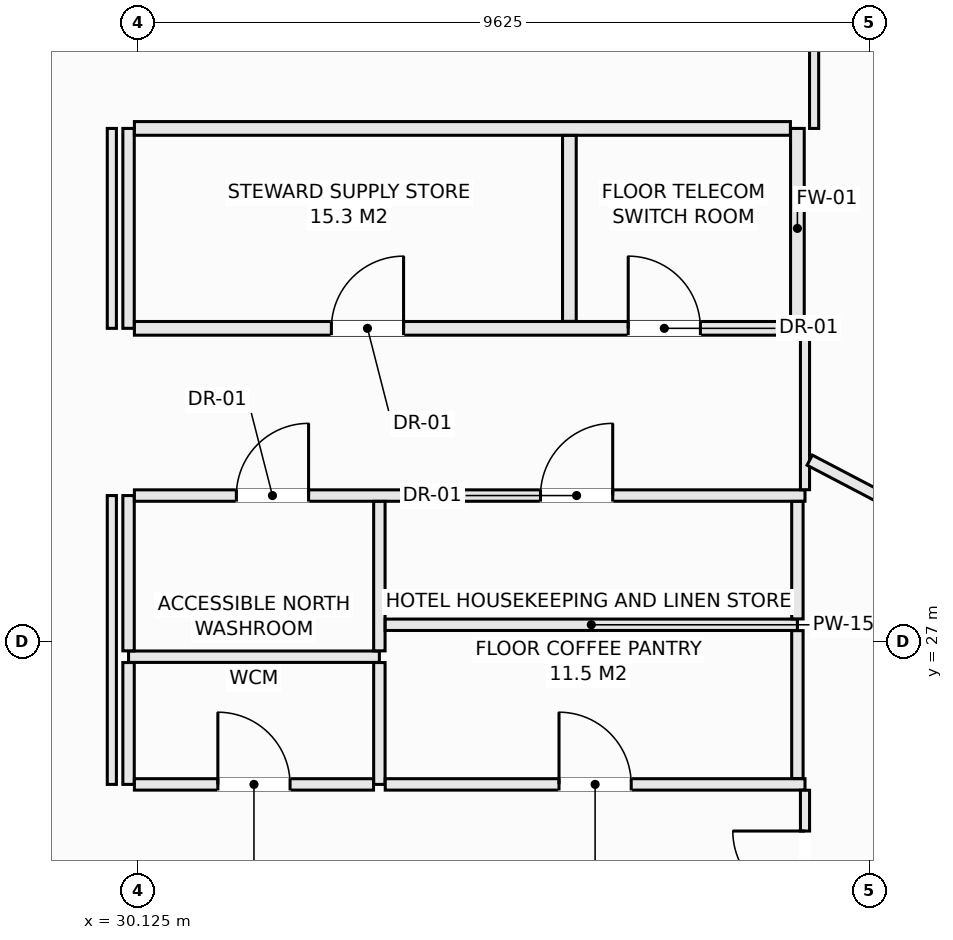
"""IFC4 building model, lengths in metres.
Left out: names, types, materials, properties, quantities, classifications, styles, units other than length and angle.
Written with IfcOpenShell. Run it as: python <this file> out.ifc"""

import sys

from ifc_helpers import new_model, si_unit, direction, frame, frame_2d, origin, place, context, subcontext, project, spatial, rectangle, extrude, element, fill, save


model = new_model("IFC4")
c1 = context("Model", 3, precision=1e-05, world=origin(), true_north=direction((0.0, 1.0)))
c2 = subcontext(c1, "Body", "Model", "MODEL_VIEW")
j1 = project(units=[si_unit("LENGTHUNIT", "METRE"), si_unit("PLANEANGLEUNIT", "RADIAN")], contexts=[c1])
p1 = place(None, origin())
s1 = spatial("IfcSite", under=j1, at=p1, CompositionType="ELEMENT")
p2 = place(p1, origin())
s2 = spatial("IfcBuilding", under=s1, at=p2, CompositionType="ELEMENT")
p3 = place(p2, frame((0.0, 0.0, 152.9)))
s3 = spatial("IfcBuildingStorey", under=s2, at=p3, CompositionType="ELEMENT", Elevation=152.9)
p4 = place(p3, frame((30.0, 26.8, 0.0), z_axis=(0.0, 0.0, 1.0), x_axis=(1.0, 0.0, 0.0)))
e1 = element("IfcWall", 1, at=p4, inside=s3, PredefinedType="PARTITIONING", context=c2, shape_type="SweptSolid", body=[
    extrude(rectangle(XDim=3.3, YDim=0.15, at=frame_2d((1.65, 0.0))), origin(), (0.0, 0.0, 1.0), 3.13),
])
p5 = place(p3, frame((30.0, 25.12, 0.0), z_axis=(0.0, 0.0, 1.0), x_axis=(0.0, 1.0, 0.0)))
e2 = element("IfcWall", 2, at=p5, inside=s3, PredefinedType="PARTITIONING", context=c2, shape_type="SweptSolid", body=[
    extrude(rectangle(XDim=1.603, YDim=0.15, at=frame_2d((0.801, 0.0))), origin(), (0.0, 0.0, 1.0), 3.13),
])
p6 = place(p3, frame((30.0, 26.877, 0.0), z_axis=(0.0, 0.0, 1.0), x_axis=(0.0, 1.0, 0.0)))
e3 = element("IfcWall", 3, at=p6, inside=s3, PredefinedType="PARTITIONING", context=c2, shape_type="SweptSolid", body=[
    extrude(rectangle(XDim=2.043, YDim=0.15, at=frame_2d((1.021, 0.0))), origin(), (0.0, 0.0, 1.0), 3.13),
])
p7 = place(p3, frame((30.0, 31.12, 0.0), z_axis=(0.0, 0.0, 1.0), x_axis=(0.0, 1.0, 0.0)))
e4 = element("IfcWall", 4, at=p7, inside=s3, PredefinedType="PARTITIONING", context=c2, shape_type="SweptSolid", body=[
    extrude(rectangle(XDim=2.63, YDim=0.15, at=frame_2d((1.315, 0.0))), origin(), (0.0, 0.0, 1.0), 3.13),
])
p8 = place(p3, frame((30.077, 28.92, 0.0), z_axis=(0.0, 0.0, 1.0), x_axis=(1.0, 0.0, 0.0)))
e5 = element("IfcWall", 5, at=p8, inside=s3, PredefinedType="PARTITIONING", context=c2, shape_type="SweptSolid", body=[
    extrude(rectangle(XDim=8.823, YDim=0.15, at=frame_2d((4.412, 0.0))), origin(), (0.0, 0.0, 1.0), 3.13),
])
p9 = place(p8, frame((1.342, 0.0, 0.0)))
e6 = element("IfcOpeningElement", 6, at=p9, cuts=e5, PredefinedType="OPENING", context=c2, shape_type="SweptSolid", body=[
    extrude(rectangle(XDim=0.95, YDim=2.1, at=frame_2d((0.475, 1.05))), frame((0.0, 0.085, 0.0), z_axis=(0.0, -1.0, 0.0), x_axis=(1.0, 0.0, 0.0)), (0.0, 0.0, 1.0), 0.17),
])
p10 = place(p8, frame((5.343, 0.0, 0.0)))
e7 = element("IfcOpeningElement", 7, at=p10, cuts=e5, PredefinedType="OPENING", context=c2, shape_type="SweptSolid", body=[
    extrude(rectangle(XDim=0.95, YDim=2.1, at=frame_2d((0.475, 1.05))), frame((0.0, 0.085, 0.0), z_axis=(0.0, -1.0, 0.0), x_axis=(1.0, 0.0, 0.0)), (0.0, 0.0, 1.0), 0.17),
])
p11 = place(p3, frame((33.3, 25.12, 0.0), z_axis=(0.0, 0.0, 1.0), x_axis=(0.0, 1.0, 0.0)))
e8 = element("IfcWall", 8, at=p11, inside=s3, PredefinedType="PARTITIONING", context=c2, shape_type="SweptSolid", body=[
    extrude(rectangle(XDim=1.603, YDim=0.15, at=frame_2d((0.801, 0.0))), origin(), (0.0, 0.0, 1.0), 3.13),
])
p12 = place(p3, frame((33.3, 26.877, 0.0), z_axis=(0.0, 0.0, 1.0), x_axis=(0.0, 1.0, 0.0)))
e9 = element("IfcWall", 9, at=p12, inside=s3, PredefinedType="PARTITIONING", context=c2, shape_type="SweptSolid", body=[
    extrude(rectangle(XDim=1.966, YDim=0.15, at=frame_2d((0.983, 0.0))), origin(), (0.0, 0.0, 1.0), 3.13),
])
p13 = place(p3, frame((30.077, 25.12, 0.0), z_axis=(0.0, 0.0, 1.0), x_axis=(1.0, 0.0, 0.0)))
e10 = element("IfcWall", 10, at=p13, inside=s3, PredefinedType="PARTITIONING", context=c2, shape_type="SweptSolid", body=[
    extrude(rectangle(XDim=3.146, YDim=0.15, at=frame_2d((1.573, 0.0))), origin(), (0.0, 0.0, 1.0), 3.13),
])
p14 = place(p13, frame((1.098, 0.0, 0.0)))
e11 = element("IfcOpeningElement", 11, at=p14, cuts=e10, PredefinedType="OPENING", context=c2, shape_type="SweptSolid", body=[
    extrude(rectangle(XDim=0.95, YDim=2.1, at=frame_2d((0.475, 1.05))), frame((0.0, 0.085, 0.0), z_axis=(0.0, -1.0, 0.0), x_axis=(1.0, 0.0, 0.0)), (0.0, 0.0, 1.0), 0.17),
])
p15 = place(p3, frame((33.377, 25.12, 0.0), z_axis=(0.0, 0.0, 1.0), x_axis=(1.0, 0.0, 0.0)))
e12 = element("IfcWall", 12, at=p15, inside=s3, PredefinedType="PARTITIONING", context=c2, shape_type="SweptSolid", body=[
    extrude(rectangle(XDim=5.523, YDim=0.15, at=frame_2d((2.761, 0.0))), origin(), (0.0, 0.0, 1.0), 3.13),
])
p16 = place(p15, frame((2.287, 0.0, 0.0)))
e13 = element("IfcOpeningElement", 13, at=p16, cuts=e12, PredefinedType="OPENING", context=c2, shape_type="SweptSolid", body=[
    extrude(rectangle(XDim=0.95, YDim=2.1, at=frame_2d((0.475, 1.05))), frame((0.0, 0.085, 0.0), z_axis=(0.0, -1.0, 0.0), x_axis=(1.0, 0.0, 0.0)), (0.0, 0.0, 1.0), 0.17),
])
p17 = place(p3, frame((33.377, 27.22, 0.0), z_axis=(0.0, 0.0, 1.0), x_axis=(1.0, 0.0, 0.0)))
e14 = element("IfcWall", 14, at=p17, inside=s3, PredefinedType="PARTITIONING", context=c2, shape_type="SweptSolid", body=[
    extrude(rectangle(XDim=5.423, YDim=0.15, at=frame_2d((2.711, 0.0))), origin(), (0.0, 0.0, 1.0), 3.13),
])
p18 = place(p3, frame((38.8, 25.197, 0.0), z_axis=(0.0, 0.0, 1.0), x_axis=(0.0, 1.0, 0.0)))
e15 = element("IfcWall", 15, at=p18, inside=s3, PredefinedType="PARTITIONING", context=c2, shape_type="SweptSolid", body=[
    extrude(rectangle(XDim=1.946, YDim=0.15, at=frame_2d((0.973, 0.0))), origin(), (0.0, 0.0, 1.0), 3.13),
])
p19 = place(p3, frame((38.8, 27.297, 0.0), z_axis=(0.0, 0.0, 1.0), x_axis=(0.0, 1.0, 0.0)))
e16 = element("IfcWall", 16, at=p19, inside=s3, PredefinedType="PARTITIONING", context=c2, shape_type="SweptSolid", body=[
    extrude(rectangle(XDim=1.546, YDim=0.15, at=frame_2d((0.773, 0.0))), origin(), (0.0, 0.0, 1.0), 3.13),
])
p20 = place(p3, frame((38.8, 31.12, 0.0), z_axis=(0.0, 0.0, 1.0), x_axis=(0.0, 1.0, 0.0)))
e17 = element("IfcWall", 17, at=p20, inside=s3, PredefinedType="SOLIDWALL", context=c2, shape_type="SweptSolid", body=[
    extrude(rectangle(XDim=2.63, YDim=0.18, at=frame_2d((1.315, 0.0))), origin(), (0.0, 0.0, 1.0), 3.13),
])
p21 = place(p3, frame((30.077, 31.12, 0.0), z_axis=(0.0, 0.0, 1.0), x_axis=(1.0, 0.0, 0.0)))
e18 = element("IfcWall", 18, at=p21, inside=s3, PredefinedType="SOLIDWALL", context=c2, shape_type="SweptSolid", body=[
    extrude(rectangle(XDim=8.631, YDim=0.18, at=frame_2d((4.315, 0.0))), origin(), (0.0, 0.0, 1.0), 3.13),
])
p22 = place(p21, frame((2.592, 0.0, 0.0)))
e19 = element("IfcOpeningElement", 19, at=p22, cuts=e18, PredefinedType="OPENING", context=c2, shape_type="SweptSolid", body=[
    extrude(rectangle(XDim=0.95, YDim=2.1, at=frame_2d((0.475, 1.05))), frame((0.0, 0.1, 0.0), z_axis=(0.0, -1.0, 0.0), x_axis=(1.0, 0.0, 0.0)), (0.0, 0.0, 1.0), 0.2),
])
p23 = place(p21, frame((6.497, 0.0, 0.0)))
e20 = element("IfcOpeningElement", 20, at=p23, cuts=e18, PredefinedType="OPENING", context=c2, shape_type="SweptSolid", body=[
    extrude(rectangle(XDim=0.95, YDim=2.1, at=frame_2d((0.475, 1.05))), frame((0.0, 0.1, 0.0), z_axis=(0.0, -1.0, 0.0), x_axis=(1.0, 0.0, 0.0)), (0.0, 0.0, 1.0), 0.2),
])
p24 = place(p3, frame((30.077, 33.75, 0.0), z_axis=(0.0, 0.0, 1.0), x_axis=(1.0, 0.0, 0.0)))
e21 = element("IfcWall", 21, at=p24, inside=s3, PredefinedType="SOLIDWALL", context=c2, shape_type="SweptSolid", body=[
    extrude(rectangle(XDim=8.631, YDim=0.18, at=frame_2d((4.315, 0.0))), origin(), (0.0, 0.0, 1.0), 3.13),
])
p25 = place(p3, frame((35.8, 31.212, 0.0), z_axis=(0.0, 0.0, 1.0), x_axis=(0.0, 1.0, 0.0)))
e22 = element("IfcWall", 22, at=p25, inside=s3, PredefinedType="SOLIDWALL", context=c2, shape_type="SweptSolid", body=[
    extrude(rectangle(XDim=2.446, YDim=0.18, at=frame_2d((1.223, 0.0))), origin(), (0.0, 0.0, 1.0), 3.13),
])
p26 = place(p3, frame((39.02, 33.75, 0.0), z_axis=(0.0, 0.0, 1.0), x_axis=(0.0, 1.0, 0.0)))
e23 = element("IfcWall", 23, at=p26, inside=s3, PredefinedType="PARTITIONING", context=c2, shape_type="SweptSolid", body=[
    extrude(rectangle(XDim=2.0, YDim=0.12, at=frame_2d((1.0, 0.0))), origin(), (0.0, 0.0, 1.0), 3.13),
])
p27 = place(p3, frame((29.78, 25.12, 0.0), z_axis=(0.0, 0.0, 1.0), x_axis=(0.0, 1.0, 0.0)))
e24 = element("IfcWall", 24, at=p27, inside=s3, PredefinedType="PARTITIONING", context=c2, shape_type="SweptSolid", body=[
    extrude(rectangle(XDim=3.8, YDim=0.12, at=frame_2d((1.9, 0.0))), origin(), (0.0, 0.0, 1.0), 3.13),
])
p28 = place(p3, frame((29.78, 31.12, 0.0), z_axis=(0.0, 0.0, 1.0), x_axis=(0.0, 1.0, 0.0)))
e25 = element("IfcWall", 25, at=p28, inside=s3, PredefinedType="PARTITIONING", context=c2, shape_type="SweptSolid", body=[
    extrude(rectangle(XDim=2.63, YDim=0.12, at=frame_2d((1.315, 0.0))), origin(), (0.0, 0.0, 1.0), 3.13),
])
p29 = place(p3, frame((38.9, 23.02, 0.0), z_axis=(0.0, 0.0, 1.0), x_axis=(0.0, 1.0, 0.0)))
e26 = element("IfcWall", 26, at=p29, inside=s3, PredefinedType="PARTITIONING", context=c2, shape_type="SweptSolid", body=[
    extrude(rectangle(XDim=2.023, YDim=0.12, at=frame_2d((1.011, 0.0))), origin(), (0.0, 0.0, 1.0), 3.13),
])
p30 = place(p29, frame((0.537, 0.0, 0.0)))
e27 = element("IfcOpeningElement", 27, at=p30, cuts=e26, PredefinedType="OPENING", context=c2, shape_type="SweptSolid", body=[
    extrude(rectangle(XDim=0.95, YDim=2.1, at=frame_2d((0.475, 1.05))), frame((0.0, 0.07, 0.0), z_axis=(0.0, -1.0, 0.0), x_axis=(1.0, 0.0, 0.0)), (0.0, 0.0, 1.0), 0.14),
])
p31 = place(p3, frame((38.9, 28.997, 0.0), z_axis=(0.0, 0.0, 1.0), x_axis=(0.0, 1.0, 0.0)))
e28 = element("IfcWall", 28, at=p31, inside=s3, PredefinedType="PARTITIONING", context=c2, shape_type="SweptSolid", body=[
    extrude(rectangle(XDim=2.123, YDim=0.12, at=frame_2d((1.062, 0.0))), origin(), (0.0, 0.0, 1.0), 3.13),
])
p32 = place(p3, frame((38.962, 29.386, 0.0), z_axis=(0.0, 0.0, 1.0), x_axis=(0.885905291329, -0.463866160434, 0.0)))
e29 = element("IfcWall", 29, at=p32, inside=s3, PredefinedType="PARTITIONING", context=c2, shape_type="SweptSolid", body=[
    extrude(rectangle(XDim=13.863, YDim=0.15, at=frame_2d((6.931, 0.0))), origin(), (0.0, 0.0, 1.0), 2.505),
])
p33 = place(p3, frame((39.021, 19.324, 0.0), z_axis=(0.0, 0.0, 1.0), x_axis=(0.724517158733, 0.689256763986, 0.0)))
e30 = element("IfcWall", 30, at=p33, inside=s3, PredefinedType="PARTITIONING", context=c2, shape_type="SweptSolid", body=[
    extrude(rectangle(XDim=9.306, YDim=0.12, at=frame_2d((4.653, 0.0))), origin(), (0.0, 0.0, 1.0), 2.505),
])
p34 = place(p9, origin())
e31 = element("IfcDoor", 31, at=p34, inside=s3, OperationType="SINGLE_SWING_RIGHT", PredefinedType="DOOR", context=c2, shape_type="SweptSolid", body=[
    extrude(rectangle(XDim=0.95, YDim=2.1, at=frame_2d((0.475, 1.05))), frame((0.0, 0.025, 0.0), z_axis=(0.0, -1.0, 0.0), x_axis=(1.0, 0.0, 0.0)), (0.0, 0.0, 1.0), 0.05),
])
fill(e6, e31)
p35 = place(p14, origin())
e32 = element("IfcDoor", 32, at=p35, inside=s3, OperationType="SINGLE_SWING_LEFT", PredefinedType="DOOR", context=c2, shape_type="SweptSolid", body=[
    extrude(rectangle(XDim=0.95, YDim=2.1, at=frame_2d((0.475, 1.05))), frame((0.0, 0.025, 0.0), z_axis=(0.0, -1.0, 0.0), x_axis=(1.0, 0.0, 0.0)), (0.0, 0.0, 1.0), 0.05),
])
fill(e11, e32)
p36 = place(p10, origin())
e33 = element("IfcDoor", 33, at=p36, inside=s3, OperationType="SINGLE_SWING_RIGHT", PredefinedType="DOOR", context=c2, shape_type="SweptSolid", body=[
    extrude(rectangle(XDim=0.95, YDim=2.1, at=frame_2d((0.475, 1.05))), frame((0.0, 0.025, 0.0), z_axis=(0.0, -1.0, 0.0), x_axis=(1.0, 0.0, 0.0)), (0.0, 0.0, 1.0), 0.05),
])
fill(e7, e33)
p37 = place(p16, origin())
e34 = element("IfcDoor", 34, at=p37, inside=s3, OperationType="SINGLE_SWING_LEFT", PredefinedType="DOOR", context=c2, shape_type="SweptSolid", body=[
    extrude(rectangle(XDim=0.95, YDim=2.1, at=frame_2d((0.475, 1.05))), frame((0.0, 0.025, 0.0), z_axis=(0.0, -1.0, 0.0), x_axis=(1.0, 0.0, 0.0)), (0.0, 0.0, 1.0), 0.05),
])
fill(e13, e34)
p38 = place(p22, origin())
e35 = element("IfcDoor", 35, at=p38, inside=s3, OperationType="SINGLE_SWING_RIGHT", PredefinedType="DOOR", context=c2, shape_type="SweptSolid", body=[
    extrude(rectangle(XDim=0.95, YDim=2.1, at=frame_2d((0.475, 1.05))), frame((0.0, 0.025, 0.0), z_axis=(0.0, -1.0, 0.0), x_axis=(1.0, 0.0, 0.0)), (0.0, 0.0, 1.0), 0.05),
])
fill(e19, e35)
p39 = place(p23, origin())
e36 = element("IfcDoor", 36, at=p39, inside=s3, OperationType="SINGLE_SWING_LEFT", PredefinedType="DOOR", context=c2, shape_type="SweptSolid", body=[
    extrude(rectangle(XDim=0.95, YDim=2.1, at=frame_2d((0.475, 1.05))), frame((0.0, 0.025, 0.0), z_axis=(0.0, -1.0, 0.0), x_axis=(1.0, 0.0, 0.0)), (0.0, 0.0, 1.0), 0.05),
])
fill(e20, e36)
p40 = place(p30, origin())
e37 = element("IfcDoor", 37, at=p40, inside=s3, OperationType="SINGLE_SWING_RIGHT", PredefinedType="DOOR", context=c2, shape_type="SweptSolid", body=[
    extrude(rectangle(XDim=0.95, YDim=2.1, at=frame_2d((0.475, 1.05))), frame((0.0, 0.025, 0.0), z_axis=(0.0, -1.0, 0.0), x_axis=(1.0, 0.0, 0.0)), (0.0, 0.0, 1.0), 0.05),
])
fill(e27, e37)
save(model, sys.argv[1])
